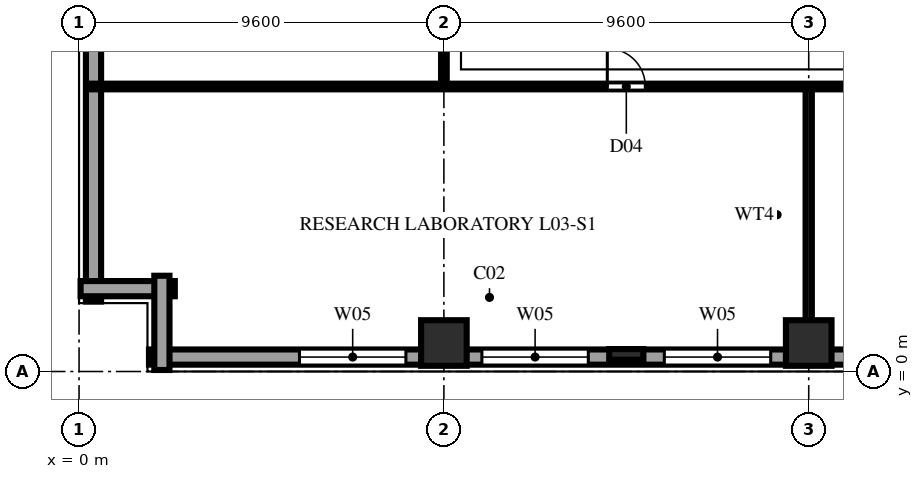
"""IFC4 building model, lengths in metres.
Left out: names, types, materials, properties, quantities, classifications, styles, units other than length and angle.
Written with IfcOpenShell. Run it as: python <this file> out.ifc"""

import sys

from ifc_helpers import new_model, si_unit, direction, frame, frame_2d, origin, origin_2d, place, context, subcontext, project, spatial, rectangle, extrude, element, fill, save


model = new_model("IFC4")
c1 = context("Model", 3, precision=1e-05, world=origin(), true_north=direction((0.0, 1.0)))
c2 = subcontext(c1, "Body", "Model", "MODEL_VIEW")
j1 = project(units=[si_unit("LENGTHUNIT", "METRE"), si_unit("PLANEANGLEUNIT", "RADIAN")], contexts=[c1])
p1 = place(None, origin())
s1 = spatial("IfcSite", under=j1, at=p1, CompositionType="ELEMENT")
p2 = place(p1, origin())
s2 = spatial("IfcBuilding", under=s1, at=p2, CompositionType="ELEMENT")
p3 = place(p2, frame((0.0, 0.0, 15.0)))
s3 = spatial("IfcBuildingStorey", under=s2, at=p3, CompositionType="ELEMENT", Elevation=15.0)
for number, where, z_axis, x_axis in (
    (1, (9.6, 0.75, 0.0), (0.0, 0.0, 1.0), (1.0, 0.0, 0.0)),
    (2, (19.2, 0.75, 0.0), (0.0, 0.0, 1.0), (1.0, 0.0, 0.0)),
):
    element("IfcColumn", number, at=place(p3, frame(where, z_axis=z_axis, x_axis=x_axis)), inside=s3, PredefinedType="COLUMN", context=c2, shape_type="SweptSolid", body=[
        extrude(rectangle(XDim=1.2, YDim=1.2, at=origin_2d()), origin(), (0.0, 0.0, 1.0), 4.6),
    ])
p4 = place(p3, frame((14.4, 0.45, 0.0), z_axis=(0.0, 0.0, 1.0), x_axis=(1.0, 0.0, 0.0)))
e3 = element("IfcColumn", 3, at=p4, inside=s3, PredefinedType="PILASTER", context=c2, shape_type="SweptSolid", body=[
    extrude(rectangle(XDim=0.9, YDim=0.28, at=origin_2d()), origin(), (0.0, 0.0, 1.0), 4.6),
])
p5 = place(p3, frame((1.84, 0.38, 0.0), z_axis=(0.0, 0.0, 1.0), x_axis=(1.0, 0.0, 0.0)))
e4 = element("IfcWall", 4, at=p5, inside=s3, PredefinedType="SOLIDWALL", context=c2, shape_type="SweptSolid", body=[
    extrude(rectangle(XDim=63.52, YDim=0.4, at=frame_2d((31.76, 0.0))), origin(), (0.0, 0.0, 1.0), 4.26),
])
p6 = place(p5, frame((3.96, 0.0, 0.75)))
e5 = element("IfcOpeningElement", 5, at=p6, cuts=e4, PredefinedType="OPENING", context=c2, shape_type="SweptSolid", body=[
    extrude(rectangle(XDim=2.8, YDim=2.3, at=frame_2d((1.4, 1.15))), frame((0.0, 0.212, 0.0), z_axis=(0.0, -1.0, 0.0), x_axis=(1.0, 0.0, 0.0)), (0.0, 0.0, 1.0), 0.424),
])
p7 = place(p5, frame((8.76, 0.0, 0.75)))
e6 = element("IfcOpeningElement", 6, at=p7, cuts=e4, PredefinedType="OPENING", context=c2, shape_type="SweptSolid", body=[
    extrude(rectangle(XDim=2.8, YDim=2.3, at=frame_2d((1.4, 1.15))), frame((0.0, 0.212, 0.0), z_axis=(0.0, -1.0, 0.0), x_axis=(1.0, 0.0, 0.0)), (0.0, 0.0, 1.0), 0.424),
])
p8 = place(p5, frame((13.56, 0.0, 0.75)))
e7 = element("IfcOpeningElement", 7, at=p8, cuts=e4, PredefinedType="OPENING", context=c2, shape_type="SweptSolid", body=[
    extrude(rectangle(XDim=2.8, YDim=2.3, at=frame_2d((1.4, 1.15))), frame((0.0, 0.212, 0.0), z_axis=(0.0, -1.0, 0.0), x_axis=(1.0, 0.0, 0.0)), (0.0, 0.0, 1.0), 0.424),
])
p9 = place(p5, frame((18.36, 0.0, 0.75)))
e8 = element("IfcOpeningElement", 8, at=p9, cuts=e4, PredefinedType="OPENING", context=c2, shape_type="SweptSolid", body=[
    extrude(rectangle(XDim=2.8, YDim=2.3, at=frame_2d((1.4, 1.15))), frame((0.0, 0.212, 0.0), z_axis=(0.0, -1.0, 0.0), x_axis=(1.0, 0.0, 0.0)), (0.0, 0.0, 1.0), 0.424),
])
p10 = place(p5, frame((23.16, 0.0, 0.75)))
e9 = element("IfcOpeningElement", 9, at=p10, cuts=e4, PredefinedType="OPENING", context=c2, shape_type="SweptSolid", body=[
    extrude(rectangle(XDim=2.8, YDim=2.3, at=frame_2d((1.4, 1.15))), frame((0.0, 0.212, 0.0), z_axis=(0.0, -1.0, 0.0), x_axis=(1.0, 0.0, 0.0)), (0.0, 0.0, 1.0), 0.424),
])
p11 = place(p5, frame((27.96, 0.0, 0.75)))
e10 = element("IfcOpeningElement", 10, at=p11, cuts=e4, PredefinedType="OPENING", context=c2, shape_type="SweptSolid", body=[
    extrude(rectangle(XDim=2.8, YDim=2.3, at=frame_2d((1.4, 1.15))), frame((0.0, 0.212, 0.0), z_axis=(0.0, -1.0, 0.0), x_axis=(1.0, 0.0, 0.0)), (0.0, 0.0, 1.0), 0.424),
])
p12 = place(p3, frame((0.38, 65.36, 0.0), z_axis=(0.0, 0.0, 1.0), x_axis=(0.0, -1.0, 0.0)))
e11 = element("IfcWall", 11, at=p12, inside=s3, PredefinedType="SOLIDWALL", context=c2, shape_type="SweptSolid", body=[
    extrude(rectangle(XDim=63.52, YDim=0.4, at=frame_2d((31.76, 0.0))), origin(), (0.0, 0.0, 1.0), 4.26),
])
p13 = place(p12, frame((32.76, 0.0, 0.75)))
e12 = element("IfcOpeningElement", 12, at=p13, cuts=e11, PredefinedType="OPENING", context=c2, shape_type="SweptSolid", body=[
    extrude(rectangle(XDim=2.8, YDim=2.3, at=frame_2d((1.4, 1.15))), frame((0.0, 0.212, 0.0), z_axis=(0.0, -1.0, 0.0), x_axis=(1.0, 0.0, 0.0)), (0.0, 0.0, 1.0), 0.424),
])
p14 = place(p12, frame((37.56, 0.0, 0.75)))
e13 = element("IfcOpeningElement", 13, at=p14, cuts=e11, PredefinedType="OPENING", context=c2, shape_type="SweptSolid", body=[
    extrude(rectangle(XDim=2.8, YDim=2.3, at=frame_2d((1.4, 1.15))), frame((0.0, 0.212, 0.0), z_axis=(0.0, -1.0, 0.0), x_axis=(1.0, 0.0, 0.0)), (0.0, 0.0, 1.0), 0.424),
])
p15 = place(p12, frame((42.36, 0.0, 0.75)))
e14 = element("IfcOpeningElement", 14, at=p15, cuts=e11, PredefinedType="OPENING", context=c2, shape_type="SweptSolid", body=[
    extrude(rectangle(XDim=2.8, YDim=2.3, at=frame_2d((1.4, 1.15))), frame((0.0, 0.212, 0.0), z_axis=(0.0, -1.0, 0.0), x_axis=(1.0, 0.0, 0.0)), (0.0, 0.0, 1.0), 0.424),
])
p16 = place(p12, frame((47.16, 0.0, 0.75)))
e15 = element("IfcOpeningElement", 15, at=p16, cuts=e11, PredefinedType="OPENING", context=c2, shape_type="SweptSolid", body=[
    extrude(rectangle(XDim=2.8, YDim=2.3, at=frame_2d((1.4, 1.15))), frame((0.0, 0.212, 0.0), z_axis=(0.0, -1.0, 0.0), x_axis=(1.0, 0.0, 0.0)), (0.0, 0.0, 1.0), 0.424),
])
p17 = place(p12, frame((51.96, 0.0, 0.75)))
e16 = element("IfcOpeningElement", 16, at=p17, cuts=e11, PredefinedType="OPENING", context=c2, shape_type="SweptSolid", body=[
    extrude(rectangle(XDim=2.8, YDim=2.3, at=frame_2d((1.4, 1.15))), frame((0.0, 0.212, 0.0), z_axis=(0.0, -1.0, 0.0), x_axis=(1.0, 0.0, 0.0)), (0.0, 0.0, 1.0), 0.424),
])
for number, where, z_axis, x_axis in (
    (17, (0.04, 2.18, 0.0), (0.0, 0.0, 1.0), (1.0, 0.0, 0.0)),
    (18, (2.18, 2.52, 0.0), (0.0, 0.0, 1.0), (0.0, -1.0, 0.0)),
):
    element("IfcWall", number, at=place(p3, frame(where, z_axis=z_axis, x_axis=x_axis)), inside=s3, PredefinedType="SOLIDWALL", context=c2, shape_type="SweptSolid", body=[
        extrude(rectangle(XDim=2.48, YDim=0.4, at=frame_2d((1.24, 0.0))), origin(), (0.0, 0.0, 1.0), 4.26),
    ])
p18 = place(p3, frame((9.6, 7.5, 0.0), z_axis=(0.0, 0.0, 1.0), x_axis=(0.0, 1.0, 0.0)))
e19 = element("IfcWall", 19, at=p18, inside=s3, PredefinedType="PARTITIONING", context=c2, shape_type="SweptSolid", body=[
    extrude(rectangle(XDim=2.1, YDim=0.15, at=frame_2d((1.05, 0.0))), origin(), (0.0, 0.0, 1.0), 3.644),
])
p19 = place(p3, frame((19.2, 0.22, 0.0), z_axis=(0.0, 0.0, 1.0), x_axis=(0.0, 1.0, 0.0)))
e20 = element("IfcWall", 20, at=p19, inside=s3, PredefinedType="PLUMBINGWALL", context=c2, shape_type="SweptSolid", body=[
    extrude(rectangle(XDim=0.53, YDim=0.165, at=frame_2d((0.265, 0.0))), origin(), (0.0, 0.0, 1.0), 4.26),
])
p20 = place(p3, frame((19.2, 0.75, 0.0), z_axis=(0.0, 0.0, 1.0), x_axis=(0.0, 1.0, 0.0)))
e21 = element("IfcWall", 21, at=p20, inside=s3, PredefinedType="PLUMBINGWALL", context=c2, shape_type="SweptSolid", body=[
    extrude(rectangle(XDim=6.75, YDim=0.165, at=frame_2d((3.375, 0.0))), origin(), (0.0, 0.0, 1.0), 3.644),
])
p21 = place(p3, frame((0.22, 7.5, 0.0), z_axis=(0.0, 0.0, 1.0), x_axis=(1.0, 0.0, 0.0)))
e22 = element("IfcWall", 22, at=p21, inside=s3, PredefinedType="PARTITIONING", context=c2, shape_type="SweptSolid", body=[
    extrude(rectangle(XDim=57.38, YDim=0.15, at=frame_2d((28.69, 0.0))), origin(), (0.0, 0.0, 1.0), 4.26),
])
p22 = place(p21, frame((13.68, 0.0, 0.0)))
e23 = element("IfcOpeningElement", 23, at=p22, cuts=e22, PredefinedType="OPENING", context=c2, shape_type="SweptSolid", body=[
    extrude(rectangle(XDim=1.0, YDim=2.2, at=frame_2d((0.5, 1.1))), frame((0.0, 0.087, 0.0), z_axis=(0.0, -1.0, 0.0), x_axis=(1.0, 0.0, 0.0)), (0.0, 0.0, 1.0), 0.174),
])
p23 = place(p21, frame((23.28, 0.0, 0.0)))
e24 = element("IfcOpeningElement", 24, at=p23, cuts=e22, PredefinedType="OPENING", context=c2, shape_type="SweptSolid", body=[
    extrude(rectangle(XDim=1.0, YDim=2.2, at=frame_2d((0.5, 1.1))), frame((0.0, 0.087, 0.0), z_axis=(0.0, -1.0, 0.0), x_axis=(1.0, 0.0, 0.0)), (0.0, 0.0, 1.0), 0.174),
])
p24 = place(p21, frame((51.23, 0.0, 0.0)))
e25 = element("IfcOpeningElement", 25, at=p24, cuts=e22, PredefinedType="OPENING", context=c2, shape_type="SweptSolid", body=[
    extrude(rectangle(XDim=1.2, YDim=2.2, at=frame_2d((0.6, 1.1))), frame((0.0, 0.087, 0.0), z_axis=(0.0, -1.0, 0.0), x_axis=(1.0, 0.0, 0.0)), (0.0, 0.0, 1.0), 0.174),
])
p25 = place(p6, origin())
e26 = element("IfcWindow", 26, at=p25, inside=s3, PartitioningType="TRIPLE_PANEL_VERTICAL", PredefinedType="WINDOW", context=c2, shape_type="SweptSolid", body=[
    extrude(rectangle(XDim=2.8, YDim=2.3, at=frame_2d((1.4, 1.15))), frame((0.0, 0.11, 0.0), z_axis=(0.0, -1.0, 0.0), x_axis=(1.0, 0.0, 0.0)), (0.0, 0.0, 1.0), 0.06),
])
fill(e5, e26)
p26 = place(p7, origin())
e27 = element("IfcWindow", 27, at=p26, inside=s3, PartitioningType="TRIPLE_PANEL_VERTICAL", PredefinedType="WINDOW", context=c2, shape_type="SweptSolid", body=[
    extrude(rectangle(XDim=2.8, YDim=2.3, at=frame_2d((1.4, 1.15))), frame((0.0, 0.11, 0.0), z_axis=(0.0, -1.0, 0.0), x_axis=(1.0, 0.0, 0.0)), (0.0, 0.0, 1.0), 0.06),
])
fill(e6, e27)
p27 = place(p8, origin())
e28 = element("IfcWindow", 28, at=p27, inside=s3, PartitioningType="TRIPLE_PANEL_VERTICAL", PredefinedType="WINDOW", context=c2, shape_type="SweptSolid", body=[
    extrude(rectangle(XDim=2.8, YDim=2.3, at=frame_2d((1.4, 1.15))), frame((0.0, 0.11, 0.0), z_axis=(0.0, -1.0, 0.0), x_axis=(1.0, 0.0, 0.0)), (0.0, 0.0, 1.0), 0.06),
])
fill(e7, e28)
p28 = place(p22, origin())
e29 = element("IfcDoor", 29, at=p28, inside=s3, OperationType="SINGLE_SWING_LEFT", PredefinedType="DOOR", context=c2, shape_type="SweptSolid", body=[
    extrude(rectangle(XDim=1.0, YDim=2.2, at=frame_2d((0.5, 1.1))), frame((0.0, 0.025, 0.0), z_axis=(0.0, -1.0, 0.0), x_axis=(1.0, 0.0, 0.0)), (0.0, 0.0, 1.0), 0.05),
])
fill(e23, e29)
save(model, sys.argv[1])
